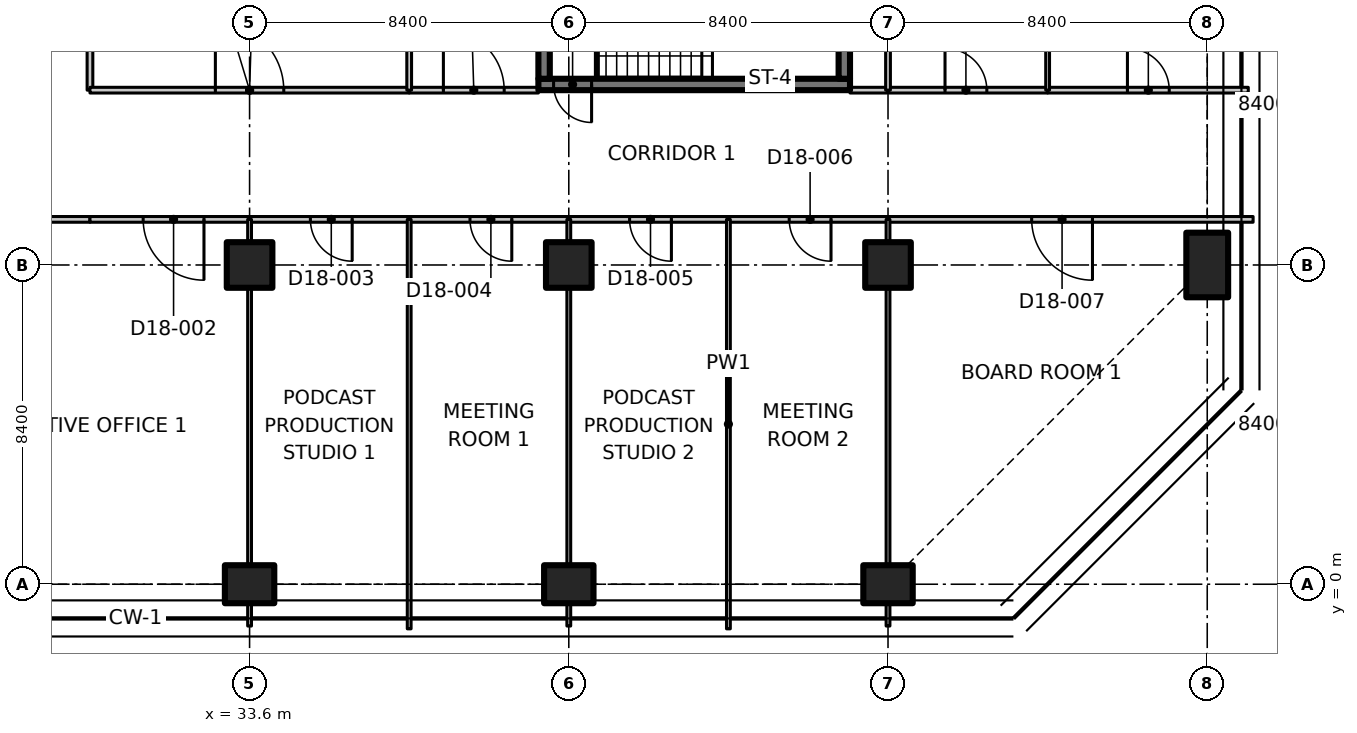
"""IFC4 building model, lengths in metres.
Left out: names, types, materials, properties, quantities, classifications, styles, units other than length and angle.
Written with IfcOpenShell. Run it as: python <this file> out.ifc"""

import sys

from ifc_helpers import new_model, si_unit, direction, frame, frame_2d, origin, origin_2d, place, context, subcontext, project, spatial, polyline, rectangle, outline, extrude, element, fill, save


model = new_model("IFC4")
c1 = context("Model", 3, precision=1e-05, world=origin(), true_north=direction((0.0, 1.0)))
c2 = subcontext(c1, "Body", "Model", "MODEL_VIEW")
j1 = project(units=[si_unit("LENGTHUNIT", "METRE"), si_unit("PLANEANGLEUNIT", "RADIAN")], contexts=[c1])
p1 = place(None, origin())
s1 = spatial("IfcSite", under=j1, at=p1, CompositionType="ELEMENT")
p2 = place(p1, origin())
s2 = spatial("IfcBuilding", under=s1, at=p2, CompositionType="ELEMENT")
p3 = place(p2, frame((0.0, 0.0, 149.3)))
s3 = spatial("IfcBuildingStorey", under=s2, at=p3, CompositionType="ELEMENT", Elevation=149.3)
p4 = place(p3, frame((33.6, 0.0, 0.0), z_axis=(0.0, 0.0, 1.0), x_axis=(0.0, 1.0, 0.0)))
e1 = element("IfcColumn", 1, at=p4, inside=s3, PredefinedType="COLUMN", context=c2, shape_type="SweptSolid", body=[
    extrude(rectangle(XDim=1.0, YDim=1.3, at=origin_2d()), origin(), (0.0, 0.0, 1.0), 3.35),
])
p5 = place(p3, frame((33.6, 8.4, 0.0), z_axis=(0.0, 0.0, 1.0), x_axis=(1.0, 0.0, 0.0)))
e2 = element("IfcColumn", 2, at=p5, inside=s3, PredefinedType="COLUMN", context=c2, shape_type="SweptSolid", body=[
    extrude(rectangle(XDim=1.2, YDim=1.2, at=origin_2d()), origin(), (0.0, 0.0, 1.0), 3.35),
])
p6 = place(p3, frame((42.0, 0.0, 0.0), z_axis=(0.0, 0.0, 1.0), x_axis=(0.0, 1.0, 0.0)))
e3 = element("IfcColumn", 3, at=p6, inside=s3, PredefinedType="COLUMN", context=c2, shape_type="SweptSolid", body=[
    extrude(rectangle(XDim=1.0, YDim=1.3, at=origin_2d()), origin(), (0.0, 0.0, 1.0), 3.35),
])
p7 = place(p3, frame((42.0, 8.4, 0.0), z_axis=(0.0, 0.0, 1.0), x_axis=(1.0, 0.0, 0.0)))
e4 = element("IfcColumn", 4, at=p7, inside=s3, PredefinedType="COLUMN", context=c2, shape_type="SweptSolid", body=[
    extrude(rectangle(XDim=1.2, YDim=1.2, at=origin_2d()), origin(), (0.0, 0.0, 1.0), 3.35),
])
p8 = place(p3, frame((50.4, 0.0, 0.0), z_axis=(0.0, 0.0, 1.0), x_axis=(0.0, 1.0, 0.0)))
e5 = element("IfcColumn", 5, at=p8, inside=s3, PredefinedType="COLUMN", context=c2, shape_type="SweptSolid", body=[
    extrude(rectangle(XDim=1.0, YDim=1.3, at=origin_2d()), origin(), (0.0, 0.0, 1.0), 3.35),
])
p9 = place(p3, frame((50.4, 8.4, 0.0), z_axis=(0.0, 0.0, 1.0), x_axis=(1.0, 0.0, 0.0)))
e6 = element("IfcColumn", 6, at=p9, inside=s3, PredefinedType="COLUMN", context=c2, shape_type="SweptSolid", body=[
    extrude(rectangle(XDim=1.2, YDim=1.2, at=origin_2d()), origin(), (0.0, 0.0, 1.0), 3.35),
])
p10 = place(p3, frame((58.8, 8.4, 0.0), z_axis=(0.0, 0.0, 1.0), x_axis=(1.0, 0.0, 0.0)))
e7 = element("IfcColumn", 7, at=p10, inside=s3, PredefinedType="COLUMN", context=c2, shape_type="SweptSolid", body=[
    extrude(rectangle(XDim=1.1, YDim=1.7, at=origin_2d()), origin(), (0.0, 0.0, 1.0), 3.35),
])
p11 = place(p3, frame((49.4, 13.15, 0.0), z_axis=(0.0, 0.0, 1.0), x_axis=(-1.0, 0.0, 0.0)))
e8 = element("IfcWall", 8, at=p11, inside=s3, PredefinedType="SHEAR", context=c2, shape_type="SweptSolid", body=[
    extrude(rectangle(XDim=8.2, YDim=0.3, at=frame_2d((4.1, 0.0))), origin(), (0.0, 0.0, 1.0), 3.35),
])
p12 = place(p11, frame((6.8, 0.0, 0.0)))
e9 = element("IfcOpeningElement", 9, at=p12, cuts=e8, PredefinedType="OPENING", context=c2, shape_type="SweptSolid", body=[
    extrude(rectangle(XDim=1.0, YDim=2.1, at=frame_2d((0.5, 1.05))), frame((0.0, 0.16, 0.0), z_axis=(0.0, -1.0, 0.0), x_axis=(1.0, 0.0, 0.0)), (0.0, 0.0, 1.0), 0.32),
])
for number, where, z_axis, x_axis in (
    (10, (41.35, 13.3, 0.0), (0.0, 0.0, 1.0), (0.0, 1.0, 0.0)),
    (11, (49.25, 13.3, 0.0), (0.0, 0.0, 1.0), (0.0, 1.0, 0.0)),
):
    element("IfcWall", number, at=place(p3, frame(where, z_axis=z_axis, x_axis=x_axis)), inside=s3, PredefinedType="SHEAR", context=c2, shape_type="SweptSolid", body=[
        extrude(rectangle(XDim=2.55, YDim=0.3, at=frame_2d((1.275, 0.0))), origin(), (0.0, 0.0, 1.0), 3.35),
    ])
p13 = place(p3, frame((29.4, 9.6, 0.0), z_axis=(0.0, 0.0, 1.0), x_axis=(-1.0, 0.0, 0.0)))
e12 = element("IfcWall", 12, at=p13, inside=s3, PredefinedType="PARTITIONING", context=c2, shape_type="SweptSolid", body=[
    extrude(rectangle(XDim=4.2, YDim=0.15, at=frame_2d((2.1, 0.0))), origin(), (0.0, 0.0, 1.0), 3.33),
])
p14 = place(p3, frame((29.4, 21.2, 0.0), z_axis=(0.0, 0.0, 1.0), x_axis=(0.0, -1.0, 0.0)))
e13 = element("IfcWall", 13, at=p14, inside=s3, PredefinedType="PARTITIONING", context=c2, shape_type="SweptSolid", body=[
    extrude(rectangle(XDim=8.2, YDim=0.15, at=frame_2d((4.1, 0.0))), origin(), (0.0, 0.0, 1.0), 3.33),
])
p15 = place(p3, frame((33.6, 9.6, 0.0), z_axis=(0.0, 0.0, 1.0), x_axis=(-1.0, 0.0, 0.0)))
e14 = element("IfcWall", 14, at=p15, inside=s3, PredefinedType="PARTITIONING", context=c2, shape_type="SweptSolid", body=[
    extrude(rectangle(XDim=4.2, YDim=0.15, at=frame_2d((2.1, 0.0))), origin(), (0.0, 0.0, 1.0), 3.33),
])
p16 = place(p15, frame((1.2, 0.0, 0.0)))
e15 = element("IfcOpeningElement", 15, at=p16, cuts=e14, PredefinedType="OPENING", context=c2, shape_type="SweptSolid", body=[
    extrude(rectangle(XDim=1.6, YDim=2.1, at=frame_2d((0.8, 1.05))), frame((0.0, 0.085, 0.0), z_axis=(0.0, -1.0, 0.0), x_axis=(1.0, 0.0, 0.0)), (0.0, 0.0, 1.0), 0.17),
])
p17 = place(p3, frame((37.8, 9.6, 0.0), z_axis=(0.0, 0.0, 1.0), x_axis=(-1.0, 0.0, 0.0)))
e16 = element("IfcWall", 16, at=p17, inside=s3, PredefinedType="PARTITIONING", context=c2, shape_type="SweptSolid", body=[
    extrude(rectangle(XDim=4.2, YDim=0.15, at=frame_2d((2.1, 0.0))), origin(), (0.0, 0.0, 1.0), 3.33),
])
p18 = place(p17, frame((1.5, 0.0, 0.0)))
e17 = element("IfcOpeningElement", 17, at=p18, cuts=e16, PredefinedType="OPENING", context=c2, shape_type="SweptSolid", body=[
    extrude(rectangle(XDim=1.1, YDim=2.1, at=frame_2d((0.55, 1.05))), frame((0.0, 0.085, 0.0), z_axis=(0.0, -1.0, 0.0), x_axis=(1.0, 0.0, 0.0)), (0.0, 0.0, 1.0), 0.17),
])
p19 = place(p3, frame((42.0, 9.6, 0.0), z_axis=(0.0, 0.0, 1.0), x_axis=(-1.0, 0.0, 0.0)))
e18 = element("IfcWall", 18, at=p19, inside=s3, PredefinedType="PARTITIONING", context=c2, shape_type="SweptSolid", body=[
    extrude(rectangle(XDim=4.2, YDim=0.15, at=frame_2d((2.1, 0.0))), origin(), (0.0, 0.0, 1.0), 3.33),
])
p20 = place(p19, frame((1.5, 0.0, 0.0)))
e19 = element("IfcOpeningElement", 19, at=p20, cuts=e18, PredefinedType="OPENING", context=c2, shape_type="SweptSolid", body=[
    extrude(rectangle(XDim=1.1, YDim=2.1, at=frame_2d((0.55, 1.05))), frame((0.0, 0.085, 0.0), z_axis=(0.0, -1.0, 0.0), x_axis=(1.0, 0.0, 0.0)), (0.0, 0.0, 1.0), 0.17),
])
p21 = place(p3, frame((46.2, 9.6, 0.0), z_axis=(0.0, 0.0, 1.0), x_axis=(-1.0, 0.0, 0.0)))
e20 = element("IfcWall", 20, at=p21, inside=s3, PredefinedType="PARTITIONING", context=c2, shape_type="SweptSolid", body=[
    extrude(rectangle(XDim=4.2, YDim=0.15, at=frame_2d((2.1, 0.0))), origin(), (0.0, 0.0, 1.0), 3.33),
])
p22 = place(p21, frame((1.5, 0.0, 0.0)))
e21 = element("IfcOpeningElement", 21, at=p22, cuts=e20, PredefinedType="OPENING", context=c2, shape_type="SweptSolid", body=[
    extrude(rectangle(XDim=1.1, YDim=2.1, at=frame_2d((0.55, 1.05))), frame((0.0, 0.085, 0.0), z_axis=(0.0, -1.0, 0.0), x_axis=(1.0, 0.0, 0.0)), (0.0, 0.0, 1.0), 0.17),
])
p23 = place(p3, frame((50.4, 9.6, 0.0), z_axis=(0.0, 0.0, 1.0), x_axis=(-1.0, 0.0, 0.0)))
e22 = element("IfcWall", 22, at=p23, inside=s3, PredefinedType="PARTITIONING", context=c2, shape_type="SweptSolid", body=[
    extrude(rectangle(XDim=4.2, YDim=0.15, at=frame_2d((2.1, 0.0))), origin(), (0.0, 0.0, 1.0), 3.33),
])
p24 = place(p23, frame((1.5, 0.0, 0.0)))
e23 = element("IfcOpeningElement", 23, at=p24, cuts=e22, PredefinedType="OPENING", context=c2, shape_type="SweptSolid", body=[
    extrude(rectangle(XDim=1.1, YDim=2.1, at=frame_2d((0.55, 1.05))), frame((0.0, 0.085, 0.0), z_axis=(0.0, -1.0, 0.0), x_axis=(1.0, 0.0, 0.0)), (0.0, 0.0, 1.0), 0.17),
])
p25 = place(p3, frame((60.007, 9.6, 0.0), z_axis=(0.0, 0.0, 1.0), x_axis=(-1.0, 0.0, 0.0)))
e24 = element("IfcWall", 24, at=p25, inside=s3, PredefinedType="PARTITIONING", context=c2, shape_type="SweptSolid", body=[
    extrude(outline(polyline([(0.0, 0.0), (9.607, 0.0), (9.607, 3.33), (1.657, 3.33), (1.655, 2.98), (0.759, 2.98), (0.757, 3.33), (0.127, 3.33), (0.0, 3.33), (0.0, 0.0)])), frame((0.0, 0.075, 0.0), z_axis=(0.0, -1.0, 0.0), x_axis=(1.0, 0.0, 0.0)), (0.0, 0.0, 1.0), 0.15),
])
p26 = place(p25, frame((4.227, 0.0, 0.0)))
e25 = element("IfcOpeningElement", 25, at=p26, cuts=e24, PredefinedType="OPENING", context=c2, shape_type="SweptSolid", body=[
    extrude(rectangle(XDim=1.6, YDim=2.1, at=frame_2d((0.8, 1.05))), frame((0.0, 0.085, 0.0), z_axis=(0.0, -1.0, 0.0), x_axis=(1.0, 0.0, 0.0)), (0.0, 0.0, 1.0), 0.17),
])
p27 = place(p3, frame((29.4, 13.0, 0.0), z_axis=(0.0, 0.0, 1.0), x_axis=(1.0, 0.0, 0.0)))
e26 = element("IfcWall", 26, at=p27, inside=s3, PredefinedType="PARTITIONING", context=c2, shape_type="SweptSolid", body=[
    extrude(rectangle(XDim=8.4, YDim=0.15, at=frame_2d((4.2, 0.0))), origin(), (0.0, 0.0, 1.0), 3.33),
])
p28 = place(p27, frame((3.3, 0.0, 0.0)))
e27 = element("IfcOpeningElement", 27, at=p28, cuts=e26, PredefinedType="OPENING", context=c2, shape_type="SweptSolid", body=[
    extrude(rectangle(XDim=1.8, YDim=2.1, at=frame_2d((0.9, 1.05))), frame((0.0, 0.085, 0.0), z_axis=(0.0, -1.0, 0.0), x_axis=(1.0, 0.0, 0.0)), (0.0, 0.0, 1.0), 0.17),
])
p29 = place(p3, frame((37.8, 13.0, 0.0), z_axis=(0.0, 0.0, 1.0), x_axis=(1.0, 0.0, 0.0)))
e28 = element("IfcWall", 28, at=p29, inside=s3, PredefinedType="PARTITIONING", context=c2, shape_type="SweptSolid", body=[
    extrude(rectangle(XDim=3.4, YDim=0.15, at=frame_2d((1.7, 0.0))), origin(), (0.0, 0.0, 1.0), 3.33),
])
p30 = place(p29, frame((0.9, 0.0, 0.0)))
e29 = element("IfcOpeningElement", 29, at=p30, cuts=e28, PredefinedType="OPENING", context=c2, shape_type="SweptSolid", body=[
    extrude(rectangle(XDim=1.6, YDim=2.1, at=frame_2d((0.8, 1.05))), frame((0.0, 0.085, 0.0), z_axis=(0.0, -1.0, 0.0), x_axis=(1.0, 0.0, 0.0)), (0.0, 0.0, 1.0), 0.17),
])
p31 = place(p3, frame((49.4, 13.0, 0.0), z_axis=(0.0, 0.0, 1.0), x_axis=(1.0, 0.0, 0.0)))
e30 = element("IfcWall", 30, at=p31, inside=s3, PredefinedType="PARTITIONING", context=c2, shape_type="SweptSolid", body=[
    extrude(rectangle(XDim=1.0, YDim=0.15, at=frame_2d((0.5, 0.0))), origin(), (0.0, 0.0, 1.0), 3.33),
])
p32 = place(p3, frame((50.4, 13.0, 0.0), z_axis=(0.0, 0.0, 1.0), x_axis=(1.0, 0.0, 0.0)))
e31 = element("IfcWall", 31, at=p32, inside=s3, PredefinedType="PARTITIONING", context=c2, shape_type="SweptSolid", body=[
    extrude(rectangle(XDim=4.2, YDim=0.15, at=frame_2d((2.1, 0.0))), origin(), (0.0, 0.0, 1.0), 3.33),
])
p33 = place(p32, frame((1.5, 0.0, 0.0)))
e32 = element("IfcOpeningElement", 32, at=p33, cuts=e31, PredefinedType="OPENING", context=c2, shape_type="SweptSolid", body=[
    extrude(rectangle(XDim=1.1, YDim=2.1, at=frame_2d((0.55, 1.05))), frame((0.0, 0.085, 0.0), z_axis=(0.0, -1.0, 0.0), x_axis=(1.0, 0.0, 0.0)), (0.0, 0.0, 1.0), 0.17),
])
p34 = place(p3, frame((54.6, 13.0, 0.0), z_axis=(0.0, 0.0, 1.0), x_axis=(1.0, 0.0, 0.0)))
e33 = element("IfcWall", 33, at=p34, inside=s3, PredefinedType="PARTITIONING", context=c2, shape_type="SweptSolid", body=[
    extrude(outline(polyline([(0.0, 0.0), (5.28, 0.0), (5.28, 3.33), (4.65, 3.33), (4.648, 2.98), (3.752, 2.98), (3.75, 3.33), (0.0, 3.33), (0.0, 0.0)])), frame((0.0, 0.075, 0.0), z_axis=(0.0, -1.0, 0.0), x_axis=(1.0, 0.0, 0.0)), (0.0, 0.0, 1.0), 0.15),
])
p35 = place(p34, frame((2.1, 0.0, 0.0)))
e34 = element("IfcOpeningElement", 34, at=p35, cuts=e33, PredefinedType="OPENING", context=c2, shape_type="SweptSolid", body=[
    extrude(rectangle(XDim=1.1, YDim=2.1, at=frame_2d((0.55, 1.05))), frame((0.0, 0.085, 0.0), z_axis=(0.0, -1.0, 0.0), x_axis=(1.0, 0.0, 0.0)), (0.0, 0.0, 1.0), 0.17),
])
p36 = place(p3, frame((33.6, 9.6, 0.0), z_axis=(0.0, 0.0, 1.0), x_axis=(0.0, -1.0, 0.0)))
e35 = element("IfcWall", 35, at=p36, inside=s3, PredefinedType="PARTITIONING", context=c2, shape_type="SweptSolid", body=[
    extrude(rectangle(XDim=0.58, YDim=0.1, at=frame_2d((0.29, 0.0))), origin(), (0.0, 0.0, 1.0), 3.33),
])
p37 = place(p3, frame((33.6, 7.78, 0.0), z_axis=(0.0, 0.0, 1.0), x_axis=(0.0, -1.0, 0.0)))
e36 = element("IfcWall", 36, at=p37, inside=s3, PredefinedType="PARTITIONING", context=c2, shape_type="SweptSolid", body=[
    extrude(rectangle(XDim=7.26, YDim=0.1, at=frame_2d((3.63, 0.0))), origin(), (0.0, 0.0, 1.0), 3.33),
])
p38 = place(p3, frame((33.6, -0.52, 0.0), z_axis=(0.0, 0.0, 1.0), x_axis=(0.0, -1.0, 0.0)))
e37 = element("IfcWall", 37, at=p38, inside=s3, PredefinedType="PARTITIONING", context=c2, shape_type="SweptSolid", body=[
    extrude(rectangle(XDim=0.58, YDim=0.1, at=frame_2d((0.29, 0.0))), origin(), (0.0, 0.0, 1.0), 3.33),
])
p39 = place(p3, frame((37.8, 9.6, 0.0), z_axis=(0.0, 0.0, 1.0), x_axis=(0.0, -1.0, 0.0)))
e38 = element("IfcWall", 38, at=p39, inside=s3, PredefinedType="PARTITIONING", context=c2, shape_type="SweptSolid", body=[
    extrude(outline(polyline([(0.0, 0.0), (10.774, 0.0), (10.774, 3.33), (10.7, 3.33), (10.05, 3.33), (10.048, 2.98), (9.152, 2.98), (9.15, 3.33), (0.0, 3.33), (0.0, 0.0)])), frame((0.0, 0.05, 0.0), z_axis=(0.0, -1.0, 0.0), x_axis=(1.0, 0.0, 0.0)), (0.0, 0.0, 1.0), 0.1),
])
p40 = place(p3, frame((42.0, 9.6, 0.0), z_axis=(0.0, 0.0, 1.0), x_axis=(0.0, -1.0, 0.0)))
e39 = element("IfcWall", 39, at=p40, inside=s3, PredefinedType="PARTITIONING", context=c2, shape_type="SweptSolid", body=[
    extrude(rectangle(XDim=0.58, YDim=0.1, at=frame_2d((0.29, 0.0))), origin(), (0.0, 0.0, 1.0), 3.33),
])
p41 = place(p3, frame((42.0, 7.78, 0.0), z_axis=(0.0, 0.0, 1.0), x_axis=(0.0, -1.0, 0.0)))
e40 = element("IfcWall", 40, at=p41, inside=s3, PredefinedType="PARTITIONING", context=c2, shape_type="SweptSolid", body=[
    extrude(rectangle(XDim=7.26, YDim=0.1, at=frame_2d((3.63, 0.0))), origin(), (0.0, 0.0, 1.0), 3.33),
])
p42 = place(p3, frame((42.0, -0.52, 0.0), z_axis=(0.0, 0.0, 1.0), x_axis=(0.0, -1.0, 0.0)))
e41 = element("IfcWall", 41, at=p42, inside=s3, PredefinedType="PARTITIONING", context=c2, shape_type="SweptSolid", body=[
    extrude(rectangle(XDim=0.58, YDim=0.1, at=frame_2d((0.29, 0.0))), origin(), (0.0, 0.0, 1.0), 3.33),
])
p43 = place(p3, frame((46.2, 9.6, 0.0), z_axis=(0.0, 0.0, 1.0), x_axis=(0.0, -1.0, 0.0)))
e42 = element("IfcWall", 42, at=p43, inside=s3, PredefinedType="PARTITIONING", context=c2, shape_type="SweptSolid", body=[
    extrude(outline(polyline([(0.0, 0.0), (10.774, 0.0), (10.774, 3.33), (10.7, 3.33), (10.05, 3.33), (10.048, 2.98), (9.152, 2.98), (9.15, 3.33), (0.0, 3.33), (0.0, 0.0)])), frame((0.0, 0.05, 0.0), z_axis=(0.0, -1.0, 0.0), x_axis=(1.0, 0.0, 0.0)), (0.0, 0.0, 1.0), 0.1),
])
p44 = place(p3, frame((50.4, 9.6, 0.0), z_axis=(0.0, 0.0, 1.0), x_axis=(0.0, -1.0, 0.0)))
e43 = element("IfcWall", 43, at=p44, inside=s3, PredefinedType="PARTITIONING", context=c2, shape_type="SweptSolid", body=[
    extrude(rectangle(XDim=0.58, YDim=0.1, at=frame_2d((0.29, 0.0))), origin(), (0.0, 0.0, 1.0), 3.33),
])
p45 = place(p3, frame((50.4, 7.78, 0.0), z_axis=(0.0, 0.0, 1.0), x_axis=(0.0, -1.0, 0.0)))
e44 = element("IfcWall", 44, at=p45, inside=s3, PredefinedType="PARTITIONING", context=c2, shape_type="SweptSolid", body=[
    extrude(outline(polyline([(0.0, 0.0), (7.26, 0.0), (7.26, 2.98), (7.116, 2.98), (7.114, 3.33), (0.0, 3.33), (0.0, 0.0)])), frame((0.0, 0.05, 0.0), z_axis=(0.0, -1.0, 0.0), x_axis=(1.0, 0.0, 0.0)), (0.0, 0.0, 1.0), 0.1),
])
p46 = place(p3, frame((50.4, -0.52, 0.0), z_axis=(0.0, 0.0, 1.0), x_axis=(0.0, -1.0, 0.0)))
e45 = element("IfcWall", 45, at=p46, inside=s3, PredefinedType="PARTITIONING", context=c2, shape_type="SweptSolid", body=[
    extrude(rectangle(XDim=0.58, YDim=0.1, at=frame_2d((0.29, 0.0))), origin(), (0.0, 0.0, 1.0), 3.33),
])
p47 = place(p3, frame((37.8, 30.526, 0.0), z_axis=(0.0, 0.0, 1.0), x_axis=(0.0, -1.0, 0.0)))
e46 = element("IfcWall", 46, at=p47, inside=s3, PredefinedType="PARTITIONING", context=c2, shape_type="SweptSolid", body=[
    extrude(outline(polyline([(0.0, 0.0), (17.526, 0.0), (17.526, 3.33), (5.776, 3.33), (5.774, 2.98), (4.878, 2.98), (4.876, 3.33), (0.283, 3.33), (0.0, 3.33), (0.0, 0.0)])), frame((0.0, 0.062, 0.0), z_axis=(0.0, -1.0, 0.0), x_axis=(1.0, 0.0, 0.0)), (0.0, 0.0, 1.0), 0.125),
])
p48 = place(p3, frame((50.4, 16.18, 0.0), z_axis=(0.0, 0.0, 1.0), x_axis=(0.0, -1.0, 0.0)))
e47 = element("IfcWall", 47, at=p48, inside=s3, PredefinedType="PARTITIONING", context=c2, shape_type="SweptSolid", body=[
    extrude(rectangle(XDim=3.18, YDim=0.125, at=frame_2d((1.59, 0.0))), origin(), (0.0, 0.0, 1.0), 3.33),
])
p49 = place(p3, frame((54.6, 25.805, 0.0), z_axis=(0.0, 0.0, 1.0), x_axis=(0.0, -1.0, 0.0)))
e48 = element("IfcWall", 48, at=p49, inside=s3, PredefinedType="PARTITIONING", context=c2, shape_type="SweptSolid", body=[
    extrude(outline(polyline([(0.0, 0.0), (12.805, 0.0), (12.805, 3.33), (5.471, 3.33), (5.469, 2.98), (4.142, 2.98), (4.14, 3.33), (0.406, 3.33), (0.0, 3.33), (0.0, 0.0)])), frame((0.0, 0.05, 0.0), z_axis=(0.0, -1.0, 0.0), x_axis=(1.0, 0.0, 0.0)), (0.0, 0.0, 1.0), 0.1),
])
p50 = place(p12, origin())
e49 = element("IfcDoor", 49, at=p50, inside=s3, OperationType="SINGLE_SWING_LEFT", PredefinedType="DOOR", context=c2, shape_type="SweptSolid", body=[
    extrude(rectangle(XDim=1.0, YDim=2.1, at=frame_2d((0.5, 1.05))), frame((0.0, 0.025, 0.0), z_axis=(0.0, -1.0, 0.0), x_axis=(1.0, 0.0, 0.0)), (0.0, 0.0, 1.0), 0.05),
])
fill(e9, e49)
p51 = place(p16, origin())
e50 = element("IfcDoor", 50, at=p51, inside=s3, OperationType="DOUBLE_DOOR_SINGLE_SWING", PredefinedType="DOOR", context=c2, shape_type="SweptSolid", body=[
    extrude(rectangle(XDim=1.6, YDim=2.1, at=frame_2d((0.8, 1.05))), frame((0.0, 0.025, 0.0), z_axis=(0.0, -1.0, 0.0), x_axis=(1.0, 0.0, 0.0)), (0.0, 0.0, 1.0), 0.05),
])
fill(e15, e50)
p52 = place(p18, origin())
e51 = element("IfcDoor", 51, at=p52, inside=s3, OperationType="SINGLE_SWING_LEFT", PredefinedType="DOOR", context=c2, shape_type="SweptSolid", body=[
    extrude(rectangle(XDim=1.1, YDim=2.1, at=frame_2d((0.55, 1.05))), frame((0.0, 0.025, 0.0), z_axis=(0.0, -1.0, 0.0), x_axis=(1.0, 0.0, 0.0)), (0.0, 0.0, 1.0), 0.05),
])
fill(e17, e51)
p53 = place(p20, origin())
e52 = element("IfcDoor", 52, at=p53, inside=s3, OperationType="SINGLE_SWING_LEFT", PredefinedType="DOOR", context=c2, shape_type="SweptSolid", body=[
    extrude(rectangle(XDim=1.1, YDim=2.1, at=frame_2d((0.55, 1.05))), frame((0.0, 0.025, 0.0), z_axis=(0.0, -1.0, 0.0), x_axis=(1.0, 0.0, 0.0)), (0.0, 0.0, 1.0), 0.05),
])
fill(e19, e52)
p54 = place(p22, origin())
e53 = element("IfcDoor", 53, at=p54, inside=s3, OperationType="SINGLE_SWING_LEFT", PredefinedType="DOOR", context=c2, shape_type="SweptSolid", body=[
    extrude(rectangle(XDim=1.1, YDim=2.1, at=frame_2d((0.55, 1.05))), frame((0.0, 0.025, 0.0), z_axis=(0.0, -1.0, 0.0), x_axis=(1.0, 0.0, 0.0)), (0.0, 0.0, 1.0), 0.05),
])
fill(e21, e53)
p55 = place(p24, origin())
e54 = element("IfcDoor", 54, at=p55, inside=s3, OperationType="SINGLE_SWING_LEFT", PredefinedType="DOOR", context=c2, shape_type="SweptSolid", body=[
    extrude(rectangle(XDim=1.1, YDim=2.1, at=frame_2d((0.55, 1.05))), frame((0.0, 0.025, 0.0), z_axis=(0.0, -1.0, 0.0), x_axis=(1.0, 0.0, 0.0)), (0.0, 0.0, 1.0), 0.05),
])
fill(e23, e54)
p56 = place(p26, origin())
e55 = element("IfcDoor", 55, at=p56, inside=s3, OperationType="DOUBLE_DOOR_SINGLE_SWING", PredefinedType="DOOR", context=c2, shape_type="SweptSolid", body=[
    extrude(rectangle(XDim=1.6, YDim=2.1, at=frame_2d((0.8, 1.05))), frame((0.0, 0.025, 0.0), z_axis=(0.0, -1.0, 0.0), x_axis=(1.0, 0.0, 0.0)), (0.0, 0.0, 1.0), 0.05),
])
fill(e25, e55)
p57 = place(p28, origin())
e56 = element("IfcDoor", 56, at=p57, inside=s3, OperationType="DOUBLE_DOOR_SINGLE_SWING", PredefinedType="DOOR", context=c2, shape_type="SweptSolid", body=[
    extrude(rectangle(XDim=1.8, YDim=2.1, at=frame_2d((0.9, 1.05))), frame((0.0, 0.025, 0.0), z_axis=(0.0, -1.0, 0.0), x_axis=(1.0, 0.0, 0.0)), (0.0, 0.0, 1.0), 0.05),
])
fill(e27, e56)
p58 = place(p30, origin())
e57 = element("IfcDoor", 57, at=p58, inside=s3, OperationType="DOUBLE_DOOR_SINGLE_SWING", PredefinedType="DOOR", context=c2, shape_type="SweptSolid", body=[
    extrude(rectangle(XDim=1.6, YDim=2.1, at=frame_2d((0.8, 1.05))), frame((0.0, 0.025, 0.0), z_axis=(0.0, -1.0, 0.0), x_axis=(1.0, 0.0, 0.0)), (0.0, 0.0, 1.0), 0.05),
])
fill(e29, e57)
p59 = place(p33, origin())
e58 = element("IfcDoor", 58, at=p59, inside=s3, OperationType="SINGLE_SWING_LEFT", PredefinedType="DOOR", context=c2, shape_type="SweptSolid", body=[
    extrude(rectangle(XDim=1.1, YDim=2.1, at=frame_2d((0.55, 1.05))), frame((0.0, 0.025, 0.0), z_axis=(0.0, -1.0, 0.0), x_axis=(1.0, 0.0, 0.0)), (0.0, 0.0, 1.0), 0.05),
])
fill(e32, e58)
p60 = place(p35, origin())
e59 = element("IfcDoor", 59, at=p60, inside=s3, OperationType="SINGLE_SWING_LEFT", PredefinedType="DOOR", context=c2, shape_type="SweptSolid", body=[
    extrude(rectangle(XDim=1.1, YDim=2.1, at=frame_2d((0.55, 1.05))), frame((0.0, 0.025, 0.0), z_axis=(0.0, -1.0, 0.0), x_axis=(1.0, 0.0, 0.0)), (0.0, 0.0, 1.0), 0.05),
])
fill(e34, e59)
save(model, sys.argv[1])
